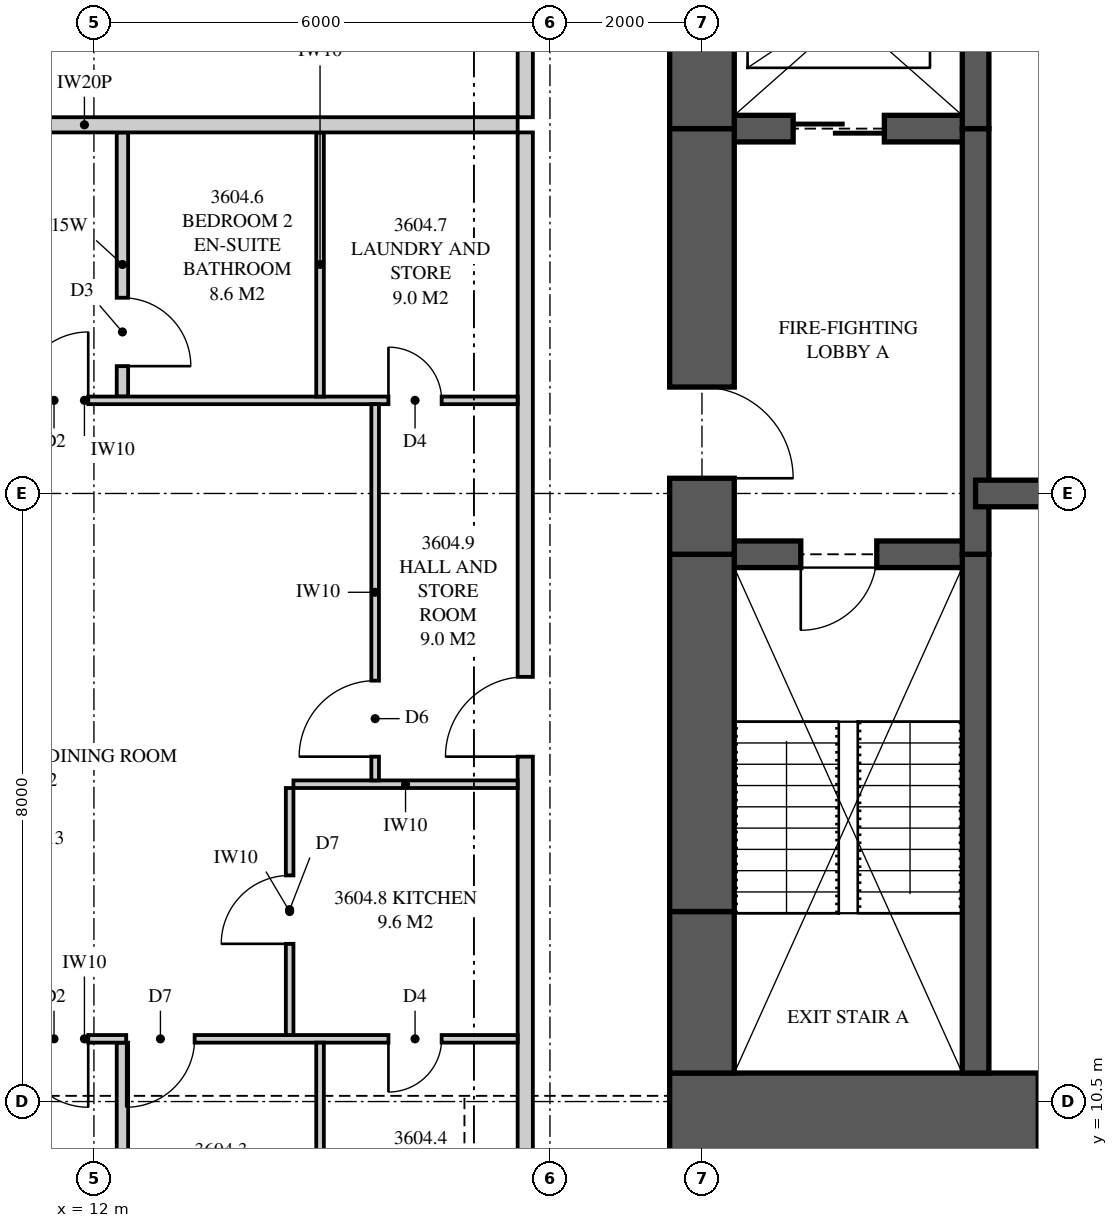
"""IFC4 building model, lengths in metres.
Left out: names, types, materials, properties, quantities, classifications, styles, units other than length and angle.
Written with IfcOpenShell. Run it as: python <this file> out.ifc"""

import sys

from ifc_helpers import new_model, si_unit, direction, frame, frame_2d, origin, place, context, subcontext, project, spatial, polyline, rectangle, outline, extrude, element, fill, save


model = new_model("IFC4")
c1 = context("Model", 3, precision=1e-05, world=origin(), true_north=direction((0.0, 1.0)))
c2 = subcontext(c1, "Body", "Model", "MODEL_VIEW")
j1 = project(units=[si_unit("LENGTHUNIT", "METRE"), si_unit("PLANEANGLEUNIT", "RADIAN")], contexts=[c1])
p1 = place(None, origin())
s1 = spatial("IfcSite", under=j1, at=p1, CompositionType="ELEMENT")
p2 = place(p1, origin())
s2 = spatial("IfcBuilding", under=s1, at=p2, CompositionType="ELEMENT")
p3 = place(p2, frame((0.0, 0.0, 131.65)))
s3 = spatial("IfcBuildingStorey", under=s2, at=p3, CompositionType="ELEMENT", Elevation=131.65)
p4 = place(p3, frame((19.575, 10.125, 0.0), z_axis=(0.0, 0.0, 1.0), x_axis=(1.0, 0.0, 0.0)))
e1 = element("IfcWall", 1, at=p4, inside=s3, PredefinedType="SHEAR", context=c2, shape_type="SweptSolid", body=[
    extrude(rectangle(XDim=6.425, YDim=1.5, at=frame_2d((3.212, 0.0))), origin(), (0.0, 0.0, 1.0), 3.35),
])
p5 = place(p4, frame((4.85, 0.0, 0.0)))
e2 = element("IfcOpeningElement", 2, at=p5, cuts=e1, PredefinedType="OPENING", context=c2, shape_type="SweptSolid", body=[
    extrude(rectangle(XDim=0.75, YDim=2.1, at=frame_2d((0.375, 1.05))), frame((0.0, 0.76, 0.0), z_axis=(0.0, -1.0, 0.0), x_axis=(1.0, 0.0, 0.0)), (0.0, 0.0, 1.0), 1.52),
])
p6 = place(p3, frame((20.0, 26.125, 0.0), z_axis=(0.0, 0.0, 1.0), x_axis=(0.0, -1.0, 0.0)))
e3 = element("IfcWall", 3, at=p6, inside=s3, PredefinedType="SHEAR", context=c2, shape_type="SweptSolid", body=[
    extrude(rectangle(XDim=2.825, YDim=0.85, at=frame_2d((1.413, 0.0))), origin(), (0.0, 0.0, 1.0), 3.35),
])
p7 = place(p3, frame((20.0, 23.3, 0.0), z_axis=(0.0, 0.0, 1.0), x_axis=(0.0, -1.0, 0.0)))
e4 = element("IfcWall", 4, at=p7, inside=s3, PredefinedType="SHEAR", context=c2, shape_type="SweptSolid", body=[
    extrude(rectangle(XDim=5.6, YDim=0.85, at=frame_2d((2.8, 0.0))), origin(), (0.0, 0.0, 1.0), 3.35),
])
p8 = place(p7, frame((3.4, 0.0, 0.0)))
e5 = element("IfcOpeningElement", 5, at=p8, cuts=e4, PredefinedType="OPENING", context=c2, shape_type="SweptSolid", body=[
    extrude(rectangle(XDim=1.2, YDim=2.2, at=frame_2d((0.6, 1.1))), frame((0.0, 0.435, 0.0), z_axis=(0.0, -1.0, 0.0), x_axis=(1.0, 0.0, 0.0)), (0.0, 0.0, 1.0), 0.87),
])
p9 = place(p3, frame((20.0, 17.7, 0.0), z_axis=(0.0, 0.0, 1.0), x_axis=(0.0, -1.0, 0.0)))
e6 = element("IfcWall", 6, at=p9, inside=s3, PredefinedType="SHEAR", context=c2, shape_type="SweptSolid", body=[
    extrude(rectangle(XDim=4.7, YDim=0.85, at=frame_2d((2.35, 0.0))), origin(), (0.0, 0.0, 1.0), 3.35),
])
p10 = place(p3, frame((20.0, 13.0, 0.0), z_axis=(0.0, 0.0, 1.0), x_axis=(0.0, -1.0, 0.0)))
e7 = element("IfcWall", 7, at=p10, inside=s3, PredefinedType="SHEAR", context=c2, shape_type="SweptSolid", body=[
    extrude(rectangle(XDim=2.125, YDim=0.85, at=frame_2d((1.062, 0.0))), origin(), (0.0, 0.0, 1.0), 3.35),
])
p11 = place(p3, frame((23.6, 10.875, 0.0), z_axis=(0.0, 0.0, 1.0), x_axis=(0.0, 1.0, 0.0)))
e8 = element("IfcWall", 8, at=p11, inside=s3, PredefinedType="SHEAR", context=c2, shape_type="SweptSolid", body=[
    extrude(rectangle(XDim=6.825, YDim=0.35, at=frame_2d((3.413, 0.0))), origin(), (0.0, 0.0, 1.0), 3.35),
])
p12 = place(p3, frame((23.6, 17.7, 0.0), z_axis=(0.0, 0.0, 1.0), x_axis=(0.0, 1.0, 0.0)))
e9 = element("IfcWall", 9, at=p12, inside=s3, PredefinedType="SHEAR", context=c2, shape_type="SweptSolid", body=[
    extrude(rectangle(XDim=5.6, YDim=0.35, at=frame_2d((2.8, 0.0))), origin(), (0.0, 0.0, 1.0), 3.35),
])
p13 = place(p3, frame((23.6, 23.3, 0.0), z_axis=(0.0, 0.0, 1.0), x_axis=(0.0, 1.0, 0.0)))
e10 = element("IfcWall", 10, at=p13, inside=s3, PredefinedType="SHEAR", context=c2, shape_type="SweptSolid", body=[
    extrude(rectangle(XDim=2.825, YDim=0.35, at=frame_2d((1.413, 0.0))), origin(), (0.0, 0.0, 1.0), 3.35),
])
p14 = place(p3, frame((20.0, 17.7, 0.0), z_axis=(0.0, 0.0, 1.0), x_axis=(1.0, 0.0, 0.0)))
e11 = element("IfcWall", 11, at=p14, inside=s3, PredefinedType="SHEAR", context=c2, shape_type="SweptSolid", body=[
    extrude(rectangle(XDim=3.6, YDim=0.35, at=frame_2d((1.8, 0.0))), origin(), (0.0, 0.0, 1.0), 3.35),
])
p15 = place(p14, frame((1.3, 0.0, 0.0)))
e12 = element("IfcOpeningElement", 12, at=p15, cuts=e11, PredefinedType="OPENING", context=c2, shape_type="SweptSolid", body=[
    extrude(rectangle(XDim=1.0, YDim=2.1, at=frame_2d((0.5, 1.05))), frame((0.0, 0.185, 0.0), z_axis=(0.0, -1.0, 0.0), x_axis=(1.0, 0.0, 0.0)), (0.0, 0.0, 1.0), 0.37),
])
p16 = place(p3, frame((20.0, 23.3, 0.0), z_axis=(0.0, 0.0, 1.0), x_axis=(1.0, 0.0, 0.0)))
e13 = element("IfcWall", 13, at=p16, inside=s3, PredefinedType="SHEAR", context=c2, shape_type="SweptSolid", body=[
    extrude(rectangle(XDim=3.6, YDim=0.35, at=frame_2d((1.8, 0.0))), origin(), (0.0, 0.0, 1.0), 3.35),
])
p17 = place(p16, frame((1.2, 0.0, 0.0)))
e14 = element("IfcOpeningElement", 14, at=p17, cuts=e13, PredefinedType="OPENING", context=c2, shape_type="SweptSolid", body=[
    extrude(rectangle(XDim=1.2, YDim=2.1, at=frame_2d((0.6, 1.05))), frame((0.0, 0.185, 0.0), z_axis=(0.0, -1.0, 0.0), x_axis=(1.0, 0.0, 0.0)), (0.0, 0.0, 1.0), 0.37),
])
p18 = place(p3, frame((23.6, 18.5, 0.0), z_axis=(0.0, 0.0, 1.0), x_axis=(1.0, 0.0, 0.0)))
e15 = element("IfcWall", 15, at=p18, inside=s3, PredefinedType="SHEAR", context=c2, shape_type="SweptSolid", body=[
    extrude(rectangle(XDim=2.4, YDim=0.35, at=frame_2d((1.2, 0.0))), origin(), (0.0, 0.0, 1.0), 3.35),
])
p19 = place(p3, frame((6.175, 23.35, 0.0), z_axis=(0.0, 0.0, 1.0), x_axis=(1.0, 0.0, 0.0)))
e16 = element("IfcWall", 16, at=p19, inside=s3, PredefinedType="PARTITIONING", context=c2, shape_type="SweptSolid", body=[
    extrude(outline(polyline([(0.529, 2.15), (0.0, 2.15), (0.0, 0.0), (0.529, 0.0), (0.529, 0.376), (1.021, 0.376), (1.021, 0.0), (11.4, 0.0), (11.4, 3.11), (5.335, 3.11), (5.335, 2.51), (2.715, 2.51), (2.715, 3.11), (1.685, 3.11), (1.685, 2.15), (1.021, 2.15), (1.021, 1.774), (0.529, 1.774), (0.529, 2.15)])), frame((0.0, 0.1, 0.0), z_axis=(0.0, -1.0, 0.0), x_axis=(1.0, 0.0, 0.0)), (0.0, 0.0, 1.0), 0.2),
])
p20 = place(p3, frame((17.675, 7.825, 0.0), z_axis=(0.0, 0.0, 1.0), x_axis=(0.0, 1.0, 0.0)))
e17 = element("IfcWall", 17, at=p20, inside=s3, PredefinedType="PARTITIONING", context=c2, shape_type="SweptSolid", body=[
    extrude(outline(polyline([(0.0, 0.0), (15.425, 0.0), (15.425, 3.11), (3.087, 3.11), (3.087, 2.541), (2.413, 2.541), (2.413, 3.11), (0.0, 3.11), (0.0, 0.0)])), frame((0.0, 0.1, 0.0), z_axis=(0.0, -1.0, 0.0), x_axis=(1.0, 0.0, 0.0)), (0.0, 0.0, 1.0), 0.2),
])
p21 = place(p20, frame((7.212, 0.0, 0.0)))
e18 = element("IfcOpeningElement", 18, at=p21, cuts=e17, PredefinedType="OPENING", context=c2, shape_type="SweptSolid", body=[
    extrude(rectangle(XDim=1.05, YDim=2.2, at=frame_2d((0.525, 1.1))), frame((0.0, 0.11, 0.0), z_axis=(0.0, -1.0, 0.0), x_axis=(1.0, 0.0, 0.0)), (0.0, 0.0, 1.0), 0.22),
])
p22 = place(p3, frame((6.175, 11.325, 0.0), z_axis=(0.0, 0.0, 1.0), x_axis=(1.0, 0.0, 0.0)))
e19 = element("IfcWall", 19, at=p22, inside=s3, PredefinedType="PARTITIONING", context=c2, shape_type="SweptSolid", body=[
    extrude(outline(polyline([(0.175, 3.11), (0.0, 3.11), (0.0, 0.0), (0.529, 0.0), (0.529, 0.325), (1.021, 0.325), (1.021, 0.0), (11.4, 0.0), (11.4, 3.11), (5.285, 3.11), (5.285, 2.51), (2.765, 2.51), (2.765, 3.11), (2.744, 3.11), (2.744, 2.541), (2.169, 2.541), (2.169, 3.11), (1.918, 3.11), (1.918, 2.15), (1.021, 2.15), (1.021, 1.825), (0.529, 1.825), (0.529, 2.15), (0.175, 2.15), (0.175, 3.11)])), frame((0.0, 0.05, 0.0), z_axis=(0.0, -1.0, 0.0), x_axis=(1.0, 0.0, 0.0)), (0.0, 0.0, 1.0), 0.1),
])
p23 = place(p22, frame((4.85, 0.0, 0.0)))
e20 = element("IfcOpeningElement", 20, at=p23, cuts=e19, PredefinedType="OPENING", context=c2, shape_type="SweptSolid", body=[
    extrude(rectangle(XDim=0.9, YDim=2.1, at=frame_2d((0.45, 1.05))), frame((0.0, 0.06, 0.0), z_axis=(0.0, -1.0, 0.0), x_axis=(1.0, 0.0, 0.0)), (0.0, 0.0, 1.0), 0.12),
])
p24 = place(p22, frame((6.25, 0.0, 0.0)))
e21 = element("IfcOpeningElement", 21, at=p24, cuts=e19, PredefinedType="OPENING", context=c2, shape_type="SweptSolid", body=[
    extrude(rectangle(XDim=0.9, YDim=2.1, at=frame_2d((0.45, 1.05))), frame((0.0, 0.06, 0.0), z_axis=(0.0, -1.0, 0.0), x_axis=(1.0, 0.0, 0.0)), (0.0, 0.0, 1.0), 0.12),
])
p25 = place(p22, frame((9.7, 0.0, 0.0)))
e22 = element("IfcOpeningElement", 22, at=p25, cuts=e19, PredefinedType="OPENING", context=c2, shape_type="SweptSolid", body=[
    extrude(rectangle(XDim=0.7, YDim=2.1, at=frame_2d((0.35, 1.05))), frame((0.0, 0.06, 0.0), z_axis=(0.0, -1.0, 0.0), x_axis=(1.0, 0.0, 0.0)), (0.0, 0.0, 1.0), 0.12),
])
p26 = place(p3, frame((6.175, 19.725, 0.0), z_axis=(0.0, 0.0, 1.0), x_axis=(1.0, 0.0, 0.0)))
e23 = element("IfcWall", 23, at=p26, inside=s3, PredefinedType="PARTITIONING", context=c2, shape_type="SweptSolid", body=[
    extrude(outline(polyline([(0.0, 0.0), (11.4, 0.0), (11.4, 3.11), (5.285, 3.11), (5.285, 2.51), (2.765, 2.51), (2.765, 3.11), (1.635, 3.11), (1.635, 2.15), (0.0, 2.15), (0.0, 3.11), (0.0, 0.0)])), frame((0.0, 0.05, 0.0), z_axis=(0.0, -1.0, 0.0), x_axis=(1.0, 0.0, 0.0)), (0.0, 0.0, 1.0), 0.1),
])
p27 = place(p26, frame((4.85, 0.0, 0.0)))
e24 = element("IfcOpeningElement", 24, at=p27, cuts=e23, PredefinedType="OPENING", context=c2, shape_type="SweptSolid", body=[
    extrude(rectangle(XDim=0.9, YDim=2.1, at=frame_2d((0.45, 1.05))), frame((0.0, 0.06, 0.0), z_axis=(0.0, -1.0, 0.0), x_axis=(1.0, 0.0, 0.0)), (0.0, 0.0, 1.0), 0.12),
])
p28 = place(p26, frame((9.7, 0.0, 0.0)))
e25 = element("IfcOpeningElement", 25, at=p28, cuts=e23, PredefinedType="OPENING", context=c2, shape_type="SweptSolid", body=[
    extrude(rectangle(XDim=0.7, YDim=2.1, at=frame_2d((0.35, 1.05))), frame((0.0, 0.06, 0.0), z_axis=(0.0, -1.0, 0.0), x_axis=(1.0, 0.0, 0.0)), (0.0, 0.0, 1.0), 0.12),
])
p29 = place(p3, frame((12.375, 7.825, 0.0), z_axis=(0.0, 0.0, 1.0), x_axis=(0.0, 1.0, 0.0)))
e26 = element("IfcWall", 26, at=p29, inside=s3, PredefinedType="PLUMBINGWALL", context=c2, shape_type="SweptSolid", body=[
    extrude(outline(polyline([(0.0, 0.0), (3.45, 0.0), (3.45, 3.11), (3.062, 3.11), (3.062, 2.541), (2.438, 2.541), (2.438, 3.11), (0.0, 3.11), (0.0, 0.0)])), frame((0.0, 0.075, 0.0), z_axis=(0.0, -1.0, 0.0), x_axis=(1.0, 0.0, 0.0)), (0.0, 0.0, 1.0), 0.15),
])
p30 = place(p3, frame((14.975, 7.825, 0.0), z_axis=(0.0, 0.0, 1.0), x_axis=(0.0, 1.0, 0.0)))
e27 = element("IfcWall", 27, at=p30, inside=s3, PredefinedType="PARTITIONING", context=c2, shape_type="SweptSolid", body=[
    extrude(outline(polyline([(0.0, 0.0), (3.45, 0.0), (3.45, 3.11), (3.037, 3.11), (3.037, 2.541), (2.463, 2.541), (2.463, 3.11), (0.0, 3.11), (0.0, 0.0)])), frame((0.0, 0.05, 0.0), z_axis=(0.0, -1.0, 0.0), x_axis=(1.0, 0.0, 0.0)), (0.0, 0.0, 1.0), 0.1),
])
p31 = place(p3, frame((12.375, 19.775, 0.0), z_axis=(0.0, 0.0, 1.0), x_axis=(0.0, 1.0, 0.0)))
e28 = element("IfcWall", 28, at=p31, inside=s3, PredefinedType="PLUMBINGWALL", context=c2, shape_type="SweptSolid", body=[
    extrude(rectangle(XDim=3.475, YDim=0.15, at=frame_2d((1.738, 0.0))), origin(), (0.0, 0.0, 1.0), 3.11),
])
p32 = place(p31, frame((0.4, 0.0, 0.0)))
e29 = element("IfcOpeningElement", 29, at=p32, cuts=e28, PredefinedType="OPENING", context=c2, shape_type="SweptSolid", body=[
    extrude(rectangle(XDim=0.9, YDim=2.1, at=frame_2d((0.45, 1.05))), frame((0.0, 0.085, 0.0), z_axis=(0.0, -1.0, 0.0), x_axis=(1.0, 0.0, 0.0)), (0.0, 0.0, 1.0), 0.17),
])
p33 = place(p3, frame((14.975, 19.775, 0.0), z_axis=(0.0, 0.0, 1.0), x_axis=(0.0, 1.0, 0.0)))
e30 = element("IfcWall", 30, at=p33, inside=s3, PredefinedType="PARTITIONING", context=c2, shape_type="SweptSolid", body=[
    extrude(rectangle(XDim=3.475, YDim=0.1, at=frame_2d((1.738, 0.0))), origin(), (0.0, 0.0, 1.0), 3.11),
])
p34 = place(p3, frame((14.575, 11.375, 0.0), z_axis=(0.0, 0.0, 1.0), x_axis=(0.0, 1.0, 0.0)))
e31 = element("IfcWall", 31, at=p34, inside=s3, PredefinedType="PARTITIONING", context=c2, shape_type="SweptSolid", body=[
    extrude(rectangle(XDim=3.25, YDim=0.1, at=frame_2d((1.625, 0.0))), origin(), (0.0, 0.0, 1.0), 3.11),
])
p35 = place(p34, frame((1.2, 0.0, 0.0)))
e32 = element("IfcOpeningElement", 32, at=p35, cuts=e31, PredefinedType="OPENING", context=c2, shape_type="SweptSolid", body=[
    extrude(rectangle(XDim=0.9, YDim=2.1, at=frame_2d((0.45, 1.05))), frame((0.0, 0.06, 0.0), z_axis=(0.0, -1.0, 0.0), x_axis=(1.0, 0.0, 0.0)), (0.0, 0.0, 1.0), 0.12),
])
p36 = place(p3, frame((14.625, 14.675, 0.0), z_axis=(0.0, 0.0, 1.0), x_axis=(1.0, 0.0, 0.0)))
e33 = element("IfcWall", 33, at=p36, inside=s3, PredefinedType="PARTITIONING", context=c2, shape_type="SweptSolid", body=[
    extrude(rectangle(XDim=2.95, YDim=0.1, at=frame_2d((1.475, 0.0))), origin(), (0.0, 0.0, 1.0), 3.11),
])
p37 = place(p3, frame((15.7, 14.725, 0.0), z_axis=(0.0, 0.0, 1.0), x_axis=(0.0, 1.0, 0.0)))
e34 = element("IfcWall", 34, at=p37, inside=s3, PredefinedType="PARTITIONING", context=c2, shape_type="SweptSolid", body=[
    extrude(rectangle(XDim=4.95, YDim=0.1, at=frame_2d((2.475, 0.0))), origin(), (0.0, 0.0, 1.0), 3.11),
])
p38 = place(p37, frame((0.312, 0.0, 0.0)))
e35 = element("IfcOpeningElement", 35, at=p38, cuts=e34, PredefinedType="OPENING", context=c2, shape_type="SweptSolid", body=[
    extrude(rectangle(XDim=1.0, YDim=2.1, at=frame_2d((0.5, 1.05))), frame((0.0, 0.06, 0.0), z_axis=(0.0, -1.0, 0.0), x_axis=(1.0, 0.0, 0.0)), (0.0, 0.0, 1.0), 0.12),
])
p39 = place(p3, frame((17.675, 23.45, 0.0), z_axis=(0.0, 0.0, 1.0), x_axis=(0.0, 1.0, 0.0)))
e36 = element("IfcWall", 36, at=p39, inside=s3, PredefinedType="PARTITIONING", context=c2, shape_type="SweptSolid", body=[
    extrude(outline(polyline([(0.0, 0.0), (5.725, 0.0), (5.725, 3.11), (3.312, 3.11), (3.312, 2.541), (2.638, 2.541), (2.638, 3.11), (0.0, 3.11), (0.0, 0.0)])), frame((0.0, 0.1, 0.0), z_axis=(0.0, -1.0, 0.0), x_axis=(1.0, 0.0, 0.0)), (0.0, 0.0, 1.0), 0.2),
])
p40 = place(p39, frame((1.962, 0.0, 0.0)))
e37 = element("IfcOpeningElement", 37, at=p40, cuts=e36, PredefinedType="OPENING", context=c2, shape_type="SweptSolid", body=[
    extrude(rectangle(XDim=1.8, YDim=2.1, at=frame_2d((0.9, 1.05))), frame((0.0, 0.11, 0.0), z_axis=(0.0, -1.0, 0.0), x_axis=(1.0, 0.0, 0.0)), (0.0, 0.0, 1.0), 0.22),
])
p41 = place(p21, origin())
e38 = element("IfcDoor", 38, at=p41, inside=s3, OperationType="SINGLE_SWING_LEFT", PredefinedType="DOOR", context=c2, shape_type="SweptSolid", body=[
    extrude(rectangle(XDim=1.05, YDim=2.2, at=frame_2d((0.525, 1.1))), frame((0.0, 0.025, 0.0), z_axis=(0.0, -1.0, 0.0), x_axis=(1.0, 0.0, 0.0)), (0.0, 0.0, 1.0), 0.05),
])
fill(e18, e38)
p42 = place(p23, frame((0.9, 0.0, 0.0), z_axis=(0.0, 0.0, 1.0), x_axis=(-1.0, 0.0, 0.0)))
e39 = element("IfcDoor", 39, at=p42, inside=s3, OperationType="SINGLE_SWING_LEFT", PredefinedType="DOOR", context=c2, shape_type="SweptSolid", body=[
    extrude(rectangle(XDim=0.9, YDim=2.1, at=frame_2d((0.45, 1.05))), frame((0.0, 0.025, 0.0), z_axis=(0.0, -1.0, 0.0), x_axis=(1.0, 0.0, 0.0)), (0.0, 0.0, 1.0), 0.05),
])
fill(e20, e39)
p43 = place(p24, frame((0.9, 0.0, 0.0), z_axis=(0.0, 0.0, 1.0), x_axis=(-1.0, 0.0, 0.0)))
e40 = element("IfcDoor", 40, at=p43, inside=s3, OperationType="SINGLE_SWING_RIGHT", PredefinedType="DOOR", context=c2, shape_type="SweptSolid", body=[
    extrude(rectangle(XDim=0.9, YDim=2.1, at=frame_2d((0.45, 1.05))), frame((0.0, 0.025, 0.0), z_axis=(0.0, -1.0, 0.0), x_axis=(1.0, 0.0, 0.0)), (0.0, 0.0, 1.0), 0.05),
])
fill(e21, e40)
p44 = place(p25, frame((0.7, 0.0, 0.0), z_axis=(0.0, 0.0, 1.0), x_axis=(-1.0, 0.0, 0.0)))
e41 = element("IfcDoor", 41, at=p44, inside=s3, OperationType="SINGLE_SWING_RIGHT", PredefinedType="DOOR", context=c2, shape_type="SweptSolid", body=[
    extrude(rectangle(XDim=0.7, YDim=2.1, at=frame_2d((0.35, 1.05))), frame((0.0, 0.025, 0.0), z_axis=(0.0, -1.0, 0.0), x_axis=(1.0, 0.0, 0.0)), (0.0, 0.0, 1.0), 0.05),
])
fill(e22, e41)
p45 = place(p27, origin())
e42 = element("IfcDoor", 42, at=p45, inside=s3, OperationType="SINGLE_SWING_RIGHT", PredefinedType="DOOR", context=c2, shape_type="SweptSolid", body=[
    extrude(rectangle(XDim=0.9, YDim=2.1, at=frame_2d((0.45, 1.05))), frame((0.0, 0.025, 0.0), z_axis=(0.0, -1.0, 0.0), x_axis=(1.0, 0.0, 0.0)), (0.0, 0.0, 1.0), 0.05),
])
fill(e24, e42)
p46 = place(p32, frame((0.9, 0.0, 0.0), z_axis=(0.0, 0.0, 1.0), x_axis=(-1.0, 0.0, 0.0)))
e43 = element("IfcDoor", 43, at=p46, inside=s3, OperationType="SINGLE_SWING_RIGHT", PredefinedType="DOOR", context=c2, shape_type="SweptSolid", body=[
    extrude(rectangle(XDim=0.9, YDim=2.1, at=frame_2d((0.45, 1.05))), frame((0.0, 0.025, 0.0), z_axis=(0.0, -1.0, 0.0), x_axis=(1.0, 0.0, 0.0)), (0.0, 0.0, 1.0), 0.05),
])
fill(e29, e43)
p47 = place(p28, origin())
e44 = element("IfcDoor", 44, at=p47, inside=s3, OperationType="SINGLE_SWING_LEFT", PredefinedType="DOOR", context=c2, shape_type="SweptSolid", body=[
    extrude(rectangle(XDim=0.7, YDim=2.1, at=frame_2d((0.35, 1.05))), frame((0.0, 0.025, 0.0), z_axis=(0.0, -1.0, 0.0), x_axis=(1.0, 0.0, 0.0)), (0.0, 0.0, 1.0), 0.05),
])
fill(e25, e44)
p48 = place(p35, origin())
e45 = element("IfcDoor", 45, at=p48, inside=s3, OperationType="SINGLE_SWING_LEFT", PredefinedType="DOOR", context=c2, shape_type="SweptSolid", body=[
    extrude(rectangle(XDim=0.9, YDim=2.1, at=frame_2d((0.45, 1.05))), frame((0.0, 0.025, 0.0), z_axis=(0.0, -1.0, 0.0), x_axis=(1.0, 0.0, 0.0)), (0.0, 0.0, 1.0), 0.05),
])
fill(e32, e45)
p49 = place(p38, origin())
e46 = element("IfcDoor", 46, at=p49, inside=s3, OperationType="SINGLE_SWING_LEFT", PredefinedType="DOOR", context=c2, shape_type="SweptSolid", body=[
    extrude(rectangle(XDim=1.0, YDim=2.1, at=frame_2d((0.5, 1.05))), frame((0.0, 0.025, 0.0), z_axis=(0.0, -1.0, 0.0), x_axis=(1.0, 0.0, 0.0)), (0.0, 0.0, 1.0), 0.05),
])
fill(e35, e46)
p50 = place(p15, frame((1.0, 0.0, 0.0), z_axis=(0.0, 0.0, 1.0), x_axis=(-1.0, 0.0, 0.0)))
e47 = element("IfcDoor", 47, at=p50, inside=s3, OperationType="SINGLE_SWING_RIGHT", PredefinedType="DOOR", context=c2, shape_type="SweptSolid", body=[
    extrude(rectangle(XDim=1.0, YDim=2.1, at=frame_2d((0.5, 1.05))), frame((0.0, 0.025, 0.0), z_axis=(0.0, -1.0, 0.0), x_axis=(1.0, 0.0, 0.0)), (0.0, 0.0, 1.0), 0.05),
])
fill(e12, e47)
p51 = place(p8, origin())
e48 = element("IfcDoor", 48, at=p51, inside=s3, OperationType="SINGLE_SWING_RIGHT", PredefinedType="DOOR", context=c2, shape_type="SweptSolid", body=[
    extrude(rectangle(XDim=1.2, YDim=2.2, at=frame_2d((0.6, 1.1))), frame((0.0, 0.025, 0.0), z_axis=(0.0, -1.0, 0.0), x_axis=(1.0, 0.0, 0.0)), (0.0, 0.0, 1.0), 0.05),
])
fill(e5, e48)
p52 = place(p17, origin())
e49 = element("IfcDoor", 49, at=p52, inside=s3, OperationType="SLIDING_TO_LEFT", PredefinedType="DOOR", context=c2, shape_type="SweptSolid", body=[
    extrude(rectangle(XDim=1.2, YDim=2.1, at=frame_2d((0.6, 1.05))), frame((0.0, 0.025, 0.0), z_axis=(0.0, -1.0, 0.0), x_axis=(1.0, 0.0, 0.0)), (0.0, 0.0, 1.0), 0.05),
])
fill(e14, e49)
save(model, sys.argv[1])
